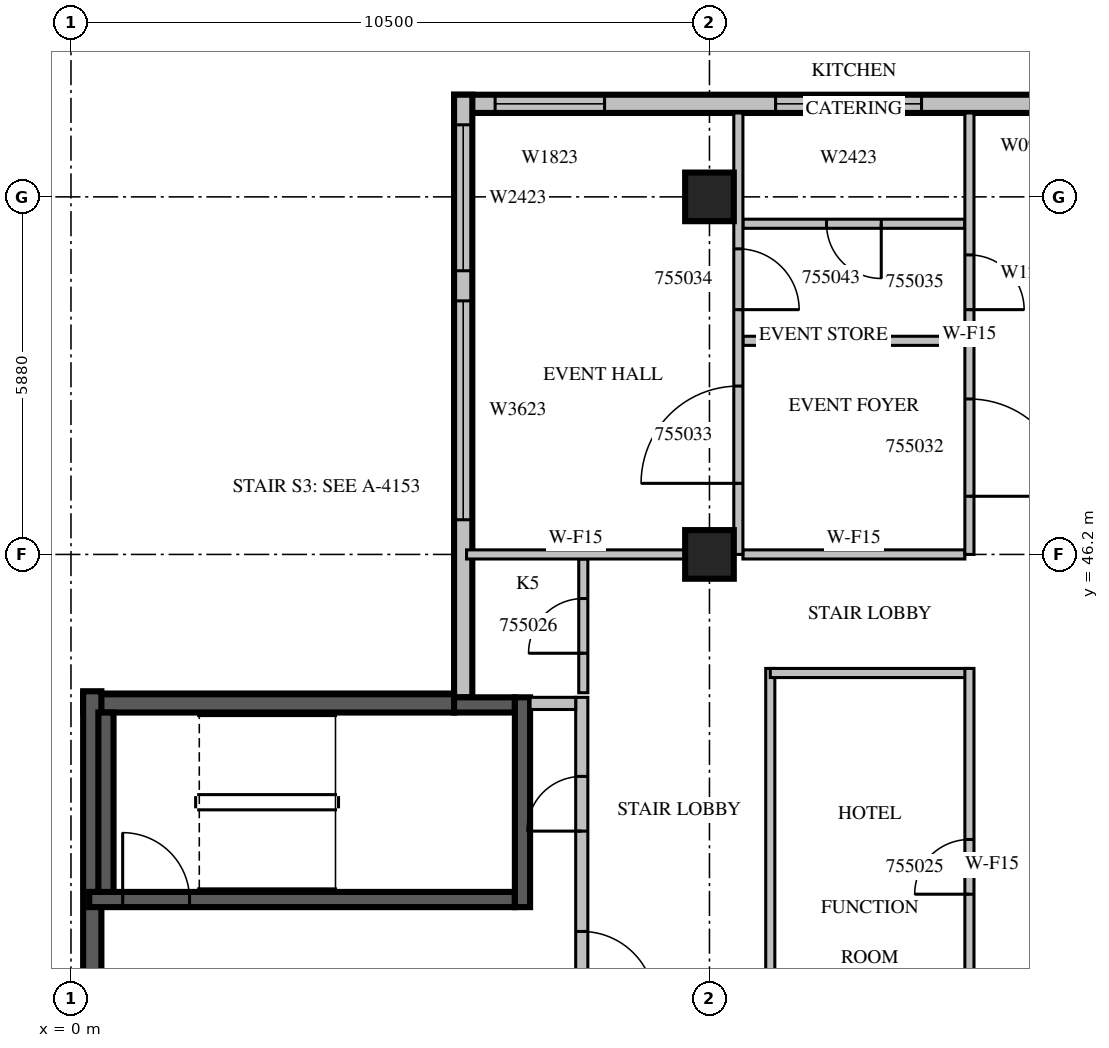
"""IFC4 building model, lengths in metres.
Left out: names, types, materials, properties, quantities, classifications, styles, units other than length and angle.
Written with IfcOpenShell. Run it as: python <this file> out.ifc"""

import sys

from ifc_helpers import new_model, si_unit, direction, frame, frame_2d, origin, origin_2d, place, context, subcontext, project, spatial, rectangle, extrude, source, transform, mapped, element, fill, save


model = new_model("IFC4")
c1 = context("Model", 3, precision=1e-05, world=origin(), true_north=direction((0.0, 1.0)))
c2 = subcontext(c1, "Body", "Model", "MODEL_VIEW")
j1 = project(units=[si_unit("LENGTHUNIT", "METRE"), si_unit("PLANEANGLEUNIT", "RADIAN")], contexts=[c1])
p1 = place(None, origin())
s1 = spatial("IfcSite", under=j1, at=p1, CompositionType="ELEMENT")
p2 = place(p1, origin())
s2 = spatial("IfcBuilding", under=s1, at=p2, CompositionType="ELEMENT")
p3 = place(p2, frame((0.0, 0.0, 242.4)))
s3 = spatial("IfcBuildingStorey", under=s2, at=p3, CompositionType="ELEMENT", Elevation=242.4)
m1 = source(origin(), c2, "Body", "SweptSolid", [
    extrude(rectangle(XDim=0.8, YDim=0.8, at=origin_2d()), origin(), (0.0, 0.0, 1.0), 3.8),
])
for number, where, z_axis, x_axis in (
    (1, (10.5, 46.2, 0.0), (0.0, 0.0, 1.0), (1.0, 0.0, 0.0)),
    (2, (10.5, 52.08, 0.0), (0.0, 0.0, 1.0), (1.0, 0.0, 0.0)),
):
    element("IfcColumn", number, at=place(p3, frame(where, z_axis=z_axis, x_axis=x_axis)), inside=s3, PredefinedType="COLUMN", context=c2, shape_type="MappedRepresentation", body=[
        mapped(m1, transform((0.0, 0.0, 0.0), scale=1.0)),
    ])
m2 = source(origin(), c2, "Body", "SweptSolid", [
    extrude(rectangle(XDim=10.5, YDim=0.3, at=frame_2d((5.25, 0.0))), origin(), (0.0, 0.0, 1.0), 3.4),
])
p4 = place(p3, frame((16.8, 53.61, 0.0), z_axis=(0.0, 0.0, 1.0), x_axis=(-1.0, 0.0, 0.0)))
e3 = element("IfcWall", 3, at=p4, inside=s3, PredefinedType="STANDARD", context=c2, shape_type="MappedRepresentation", body=[
    mapped(m2, transform((0.0, 0.0, 0.0), scale=1.0)),
])
m3 = source(origin(), c2, "Body", "SweptSolid", [
    extrude(rectangle(XDim=1.8, YDim=2.3, at=frame_2d((0.9, 1.15))), frame((0.0, 0.16, 0.0), z_axis=(0.0, -1.0, 0.0), x_axis=(1.0, 0.0, 0.0)), (0.0, 0.0, 1.0), 0.32),
])
p5 = place(p4, frame((8.025, 0.0, 0.6)))
e4 = element("IfcOpeningElement", 4, at=p5, cuts=e3, PredefinedType="OPENING", context=c2, shape_type="MappedRepresentation", body=[
    mapped(m3, transform((0.0, 0.0, 0.0), scale=1.0)),
])
m4 = source(origin(), c2, "Body", "SweptSolid", [
    extrude(rectangle(XDim=2.4, YDim=2.3, at=frame_2d((1.2, 1.15))), frame((0.0, 0.16, 0.0), z_axis=(0.0, -1.0, 0.0), x_axis=(1.0, 0.0, 0.0)), (0.0, 0.0, 1.0), 0.32),
])
p6 = place(p4, frame((2.812, 0.0, 0.6)))
e5 = element("IfcOpeningElement", 5, at=p6, cuts=e3, PredefinedType="OPENING", context=c2, shape_type="MappedRepresentation", body=[
    mapped(m4, transform((0.0, 0.0, 0.0), scale=1.0)),
])
m5 = source(origin(), c2, "Body", "SweptSolid", [
    extrude(rectangle(XDim=9.91, YDim=0.3, at=frame_2d((4.955, 0.0))), origin(), (0.0, 0.0, 1.0), 3.4),
])
p7 = place(p3, frame((6.45, 53.76, 0.0), z_axis=(0.0, 0.0, 1.0), x_axis=(0.0, -1.0, 0.0)))
e6 = element("IfcWall", 6, at=p7, inside=s3, PredefinedType="STANDARD", context=c2, shape_type="MappedRepresentation", body=[
    mapped(m5, transform((0.0, 0.0, 0.0), scale=1.0)),
])
m6 = source(origin(), c2, "Body", "SweptSolid", [
    extrude(rectangle(XDim=3.6, YDim=2.3, at=frame_2d((1.8, 1.15))), frame((0.0, 0.16, 0.0), z_axis=(0.0, -1.0, 0.0), x_axis=(1.0, 0.0, 0.0)), (0.0, 0.0, 1.0), 0.32),
])
p8 = place(p7, frame((3.39, 0.0, 0.6)))
e7 = element("IfcOpeningElement", 7, at=p8, cuts=e6, PredefinedType="OPENING", context=c2, shape_type="MappedRepresentation", body=[
    mapped(m6, transform((0.0, 0.0, 0.0), scale=1.0)),
])
p9 = place(p7, frame((0.495, 0.0, 0.6)))
e8 = element("IfcOpeningElement", 8, at=p9, cuts=e6, PredefinedType="OPENING", context=c2, shape_type="MappedRepresentation", body=[
    mapped(m4, transform((0.0, 0.0, 0.0), scale=1.0)),
])
m7 = source(origin(), c2, "Body", "SweptSolid", [
    extrude(rectangle(XDim=6.1, YDim=0.3, at=frame_2d((3.05, 0.0))), origin(), (0.0, 0.0, 1.0), 3.4),
])
p10 = place(p3, frame((6.3, 43.75, 0.0), z_axis=(0.0, 0.0, 1.0), x_axis=(-1.0, 0.0, 0.0)))
e9 = element("IfcWall", 9, at=p10, inside=s3, PredefinedType="SOLIDWALL", context=c2, shape_type="MappedRepresentation", body=[
    mapped(m7, transform((0.0, 0.0, 0.0), scale=1.0)),
])
m8 = source(origin(), c2, "Body", "SweptSolid", [
    extrude(rectangle(XDim=5.65, YDim=0.3, at=frame_2d((2.825, 0.0))), origin(), (0.0, 0.0, 1.0), 3.4),
])
p11 = place(p3, frame((0.35, 43.95, 0.0), z_axis=(0.0, 0.0, 1.0), x_axis=(0.0, -1.0, 0.0)))
e10 = element("IfcWall", 10, at=p11, inside=s3, PredefinedType="SOLIDWALL", context=c2, shape_type="MappedRepresentation", body=[
    mapped(m8, transform((0.0, 0.0, 0.0), scale=1.0)),
])
m9 = source(origin(), c2, "Body", "SweptSolid", [
    extrude(rectangle(XDim=7.0, YDim=0.25, at=frame_2d((3.5, 0.0))), origin(), (0.0, 0.0, 1.0), 3.4),
])
p12 = place(p3, frame((0.3, 40.525, 0.0), z_axis=(0.0, 0.0, 1.0), x_axis=(1.0, 0.0, 0.0)))
e11 = element("IfcWall", 11, at=p12, inside=s3, PredefinedType="SOLIDWALL", context=c2, shape_type="MappedRepresentation", body=[
    mapped(m9, transform((0.0, 0.0, 0.0), scale=1.0)),
])
m10 = source(origin(), c2, "Body", "SweptSolid", [
    extrude(rectangle(XDim=1.1, YDim=2.1, at=frame_2d((0.55, 1.05))), frame((0.0, 0.135, 0.0), z_axis=(0.0, -1.0, 0.0), x_axis=(1.0, 0.0, 0.0)), (0.0, 0.0, 1.0), 0.27),
])
p13 = place(p12, frame((0.55, 0.0, 0.0)))
e12 = element("IfcOpeningElement", 12, at=p13, cuts=e11, PredefinedType="OPENING", context=c2, shape_type="MappedRepresentation", body=[
    mapped(m10, transform((0.0, 0.0, 0.0), scale=1.0)),
])
m11 = source(origin(), c2, "Body", "SweptSolid", [
    extrude(rectangle(XDim=1.0, YDim=0.25, at=frame_2d((0.5, 0.0))), origin(), (0.0, 0.0, 1.0), 3.4),
])
p14 = place(p3, frame((6.3, 43.725, 0.0), z_axis=(0.0, 0.0, 1.0), x_axis=(1.0, 0.0, 0.0)))
e13 = element("IfcWall", 13, at=p14, inside=s3, PredefinedType="SOLIDWALL", context=c2, shape_type="MappedRepresentation", body=[
    mapped(m11, transform((0.0, 0.0, 0.0), scale=1.0)),
])
m12 = source(origin(), c2, "Body", "SweptSolid", [
    extrude(rectangle(XDim=3.45, YDim=0.25, at=frame_2d((1.725, 0.0))), origin(), (0.0, 0.0, 1.0), 3.4),
])
p15 = place(p3, frame((7.425, 40.4, 0.0), z_axis=(0.0, 0.0, 1.0), x_axis=(0.0, 1.0, 0.0)))
e14 = element("IfcWall", 14, at=p15, inside=s3, PredefinedType="SOLIDWALL", context=c2, shape_type="MappedRepresentation", body=[
    mapped(m12, transform((0.0, 0.0, 0.0), scale=1.0)),
])
m13 = source(origin(), c2, "Body", "SweptSolid", [
    extrude(rectangle(XDim=2.95, YDim=0.25, at=frame_2d((1.475, 0.0))), origin(), (0.0, 0.0, 1.0), 3.4),
])
p16 = place(p3, frame((0.575, 40.65, 0.0), z_axis=(0.0, 0.0, 1.0), x_axis=(0.0, 1.0, 0.0)))
e15 = element("IfcWall", 15, at=p16, inside=s3, PredefinedType="SOLIDWALL", context=c2, shape_type="MappedRepresentation", body=[
    mapped(m13, transform((0.0, 0.0, 0.0), scale=1.0)),
])
m14 = source(origin(), c2, "Body", "SweptSolid", [
    extrude(rectangle(XDim=5.45, YDim=0.2, at=frame_2d((2.725, 0.0))), origin(), (0.0, 0.0, 1.0), 3.4),
])
p17 = place(p3, frame((8.4, 38.4, 0.0), z_axis=(0.0, 0.0, 1.0), x_axis=(0.0, 1.0, 0.0)))
e16 = element("IfcWall", 16, at=p17, inside=s3, PredefinedType="PARTITIONING", context=c2, shape_type="MappedRepresentation", body=[
    mapped(m14, transform((0.0, 0.0, 0.0), scale=1.0)),
])
m15 = source(origin(), c2, "Body", "SweptSolid", [
    extrude(rectangle(XDim=1.2, YDim=2.1, at=frame_2d((0.6, 1.05))), frame((0.0, 0.11, 0.0), z_axis=(0.0, -1.0, 0.0), x_axis=(1.0, 0.0, 0.0)), (0.0, 0.0, 1.0), 0.22),
])
p18 = place(p17, frame((0.4, 0.0, 0.0)))
e17 = element("IfcOpeningElement", 17, at=p18, cuts=e16, PredefinedType="OPENING", context=c2, shape_type="MappedRepresentation", body=[
    mapped(m15, transform((0.0, 0.0, 0.0), scale=1.0)),
])
m16 = source(origin(), c2, "Body", "SweptSolid", [
    extrude(rectangle(XDim=0.9, YDim=2.1, at=frame_2d((0.45, 1.05))), frame((0.0, 0.11, 0.0), z_axis=(0.0, -1.0, 0.0), x_axis=(1.0, 0.0, 0.0)), (0.0, 0.0, 1.0), 0.22),
])
p19 = place(p17, frame((3.25, 0.0, 0.0)))
e18 = element("IfcOpeningElement", 18, at=p19, cuts=e16, PredefinedType="OPENING", context=c2, shape_type="MappedRepresentation", body=[
    mapped(m16, transform((0.0, 0.0, 0.0), scale=1.0)),
])
m17 = source(origin(), c2, "Body", "SweptSolid", [
    extrude(rectangle(XDim=0.75, YDim=0.2, at=frame_2d((0.375, 0.0))), origin(), (0.0, 0.0, 1.0), 3.4),
])
p20 = place(p3, frame((7.55, 43.75, 0.0), z_axis=(0.0, 0.0, 1.0), x_axis=(1.0, 0.0, 0.0)))
e19 = element("IfcWall", 19, at=p20, inside=s3, PredefinedType="PARTITIONING", context=c2, shape_type="MappedRepresentation", body=[
    mapped(m17, transform((0.0, 0.0, 0.0), scale=1.0)),
])
m18 = source(origin(), c2, "Body", "SweptSolid", [
    extrude(rectangle(XDim=6.45, YDim=0.15, at=frame_2d((3.225, 0.0))), origin(), (0.0, 0.0, 1.0), 3.4),
])
p21 = place(p3, frame((11.5, 44.325, 0.0), z_axis=(0.0, 0.0, 1.0), x_axis=(0.0, -1.0, 0.0)))
e20 = element("IfcWall", 20, at=p21, inside=s3, PredefinedType="PARTITIONING", context=c2, shape_type="MappedRepresentation", body=[
    mapped(m18, transform((0.0, 0.0, 0.0), scale=1.0)),
])
m19 = source(origin(), c2, "Body", "SweptSolid", [
    extrude(rectangle(XDim=3.275, YDim=0.15, at=frame_2d((1.637, 0.0))), origin(), (0.0, 0.0, 1.0), 3.4),
])
p22 = place(p3, frame((14.775, 44.25, 0.0), z_axis=(0.0, 0.0, 1.0), x_axis=(-1.0, 0.0, 0.0)))
e21 = element("IfcWall", 21, at=p22, inside=s3, PredefinedType="PARTITIONING", context=c2, shape_type="MappedRepresentation", body=[
    mapped(m19, transform((0.0, 0.0, 0.0), scale=1.0)),
])
p23 = place(p3, frame((14.775, 37.875, 0.0), z_axis=(0.0, 0.0, 1.0), x_axis=(0.0, 1.0, 0.0)))
e22 = element("IfcWall", 22, at=p23, inside=s3, PredefinedType="PARTITIONING", context=c2, shape_type="MappedRepresentation", body=[
    mapped(m18, transform((0.0, 0.0, 0.0), scale=1.0)),
])
m20 = source(origin(), c2, "Body", "SweptSolid", [
    extrude(rectangle(XDim=0.9, YDim=2.1, at=frame_2d((0.45, 1.05))), frame((0.0, 0.085, 0.0), z_axis=(0.0, -1.0, 0.0), x_axis=(1.0, 0.0, 0.0)), (0.0, 0.0, 1.0), 0.17),
])
p24 = place(p23, frame((2.737, 0.0, 0.0)))
e23 = element("IfcOpeningElement", 23, at=p24, cuts=e22, PredefinedType="OPENING", context=c2, shape_type="MappedRepresentation", body=[
    mapped(m20, transform((0.0, 0.0, 0.0), scale=1.0)),
])
m21 = source(origin(), c2, "Body", "SweptSolid", [
    extrude(rectangle(XDim=2.2, YDim=0.15, at=frame_2d((1.1, 0.0))), origin(), (0.0, 0.0, 1.0), 3.4),
])
p25 = place(p3, frame((8.425, 43.925, 0.0), z_axis=(0.0, 0.0, 1.0), x_axis=(0.0, 1.0, 0.0)))
e24 = element("IfcWall", 24, at=p25, inside=s3, PredefinedType="PARTITIONING", context=c2, shape_type="MappedRepresentation", body=[
    mapped(m21, transform((0.0, 0.0, 0.0), scale=1.0)),
])
p26 = place(p25, frame((0.65, 0.0, 0.0)))
e25 = element("IfcOpeningElement", 25, at=p26, cuts=e24, PredefinedType="OPENING", context=c2, shape_type="MappedRepresentation", body=[
    mapped(m20, transform((0.0, 0.0, 0.0), scale=1.0)),
])
m22 = source(origin(), c2, "Body", "SweptSolid", [
    extrude(rectangle(XDim=3.65, YDim=0.15, at=frame_2d((1.825, 0.0))), origin(), (0.0, 0.0, 1.0), 3.4),
])
p27 = place(p3, frame((14.7, 49.713, 0.0), z_axis=(0.0, 0.0, 1.0), x_axis=(-1.0, 0.0, 0.0)))
e26 = element("IfcWall", 26, at=p27, inside=s3, PredefinedType="PARTITIONING", context=c2, shape_type="MappedRepresentation", body=[
    mapped(m22, transform((0.0, 0.0, 0.0), scale=1.0)),
])
p28 = place(p3, frame((14.7, 51.638, 0.0), z_axis=(0.0, 0.0, 1.0), x_axis=(-1.0, 0.0, 0.0)))
e27 = element("IfcWall", 27, at=p28, inside=s3, PredefinedType="PARTITIONING", context=c2, shape_type="MappedRepresentation", body=[
    mapped(m22, transform((0.0, 0.0, 0.0), scale=1.0)),
])
p29 = place(p28, frame((1.375, 0.0, 0.0)))
e28 = element("IfcOpeningElement", 28, at=p29, cuts=e27, PredefinedType="OPENING", context=c2, shape_type="MappedRepresentation", body=[
    mapped(m20, transform((0.0, 0.0, 0.0), scale=1.0)),
])
m23 = source(origin(), c2, "Body", "SweptSolid", [
    extrude(rectangle(XDim=3.596, YDim=0.15, at=frame_2d((1.798, 0.0))), origin(), (0.0, 0.0, 1.0), 3.4),
])
p30 = place(p3, frame((10.101, 46.2, 0.0), z_axis=(0.0, 0.0, 1.0), x_axis=(-1.0, 0.0, 0.0)))
e29 = element("IfcWall", 29, at=p30, inside=s3, PredefinedType="PARTITIONING", context=c2, shape_type="MappedRepresentation", body=[
    mapped(m23, transform((0.0, 0.0, 0.0), scale=1.0)),
])
p31 = place(p3, frame((14.7, 46.2, 0.0), z_axis=(0.0, 0.0, 1.0), x_axis=(-1.0, 0.0, 0.0)))
e30 = element("IfcWall", 30, at=p31, inside=s3, PredefinedType="PARTITIONING", context=c2, shape_type="MappedRepresentation", body=[
    mapped(m22, transform((0.0, 0.0, 0.0), scale=1.0)),
])
m24 = source(origin(), c2, "Body", "SweptSolid", [
    extrude(rectangle(XDim=7.26, YDim=0.15, at=frame_2d((3.63, 0.0))), origin(), (0.0, 0.0, 1.0), 3.4),
])
p32 = place(p3, frame((10.975, 46.2, 0.0), z_axis=(0.0, 0.0, 1.0), x_axis=(0.0, 1.0, 0.0)))
e31 = element("IfcWall", 31, at=p32, inside=s3, PredefinedType="PARTITIONING", context=c2, shape_type="MappedRepresentation", body=[
    mapped(m24, transform((0.0, 0.0, 0.0), scale=1.0)),
])
m25 = source(origin(), c2, "Body", "SweptSolid", [
    extrude(rectangle(XDim=1.6, YDim=2.1, at=frame_2d((0.8, 1.05))), frame((0.0, 0.085, 0.0), z_axis=(0.0, -1.0, 0.0), x_axis=(1.0, 0.0, 0.0)), (0.0, 0.0, 1.0), 0.17),
])
p33 = place(p32, frame((1.169, 0.0, 0.0)))
e32 = element("IfcOpeningElement", 32, at=p33, cuts=e31, PredefinedType="OPENING", context=c2, shape_type="MappedRepresentation", body=[
    mapped(m25, transform((0.0, 0.0, 0.0), scale=1.0)),
])
m26 = source(origin(), c2, "Body", "SweptSolid", [
    extrude(rectangle(XDim=1.0, YDim=2.1, at=frame_2d((0.5, 1.05))), frame((0.0, 0.085, 0.0), z_axis=(0.0, -1.0, 0.0), x_axis=(1.0, 0.0, 0.0)), (0.0, 0.0, 1.0), 0.17),
])
p34 = place(p32, frame((4.025, 0.0, 0.0)))
e33 = element("IfcOpeningElement", 33, at=p34, cuts=e31, PredefinedType="OPENING", context=c2, shape_type="MappedRepresentation", body=[
    mapped(m26, transform((0.0, 0.0, 0.0), scale=1.0)),
])
p35 = place(p3, frame((14.775, 46.2, 0.0), z_axis=(0.0, 0.0, 1.0), x_axis=(0.0, 1.0, 0.0)))
e34 = element("IfcWall", 34, at=p35, inside=s3, PredefinedType="PARTITIONING", context=c2, shape_type="MappedRepresentation", body=[
    mapped(m24, transform((0.0, 0.0, 0.0), scale=1.0)),
])
p36 = place(p35, frame((0.956, 0.0, 0.0)))
e35 = element("IfcOpeningElement", 35, at=p36, cuts=e34, PredefinedType="OPENING", context=c2, shape_type="MappedRepresentation", body=[
    mapped(m25, transform((0.0, 0.0, 0.0), scale=1.0)),
])
p37 = place(p35, frame((4.025, 0.0, 0.0)))
e36 = element("IfcOpeningElement", 36, at=p37, cuts=e34, PredefinedType="OPENING", context=c2, shape_type="MappedRepresentation", body=[
    mapped(m20, transform((0.0, 0.0, 0.0), scale=1.0)),
])
m27 = source(origin(), c2, "Body", "SweptSolid", [
    extrude(rectangle(XDim=1.8, YDim=2.3, at=frame_2d((0.9, 1.15))), frame((0.0, 0.03, 0.0), z_axis=(0.0, -1.0, 0.0), x_axis=(1.0, 0.0, 0.0)), (0.0, 0.0, 1.0), 0.06),
])
p38 = place(p5, origin())
e37 = element("IfcWindow", 37, at=p38, inside=s3, PartitioningType="SINGLE_PANEL", PredefinedType="WINDOW", context=c2, shape_type="MappedRepresentation", body=[
    mapped(m27, transform((0.0, 0.0, 0.0), scale=1.0)),
])
fill(e4, e37)
m28 = source(origin(), c2, "Body", "SweptSolid", [
    extrude(rectangle(XDim=2.4, YDim=2.3, at=frame_2d((1.2, 1.15))), frame((0.0, 0.03, 0.0), z_axis=(0.0, -1.0, 0.0), x_axis=(1.0, 0.0, 0.0)), (0.0, 0.0, 1.0), 0.06),
])
p39 = place(p6, origin())
e38 = element("IfcWindow", 38, at=p39, inside=s3, PartitioningType="SINGLE_PANEL", PredefinedType="WINDOW", context=c2, shape_type="MappedRepresentation", body=[
    mapped(m28, transform((0.0, 0.0, 0.0), scale=1.0)),
])
fill(e5, e38)
m29 = source(origin(), c2, "Body", "SweptSolid", [
    extrude(rectangle(XDim=3.6, YDim=2.3, at=frame_2d((1.8, 1.15))), frame((0.0, 0.03, 0.0), z_axis=(0.0, -1.0, 0.0), x_axis=(1.0, 0.0, 0.0)), (0.0, 0.0, 1.0), 0.06),
])
p40 = place(p8, origin())
e39 = element("IfcWindow", 39, at=p40, inside=s3, PartitioningType="SINGLE_PANEL", PredefinedType="WINDOW", context=c2, shape_type="MappedRepresentation", body=[
    mapped(m29, transform((0.0, 0.0, 0.0), scale=1.0)),
])
fill(e7, e39)
p41 = place(p9, origin())
e40 = element("IfcWindow", 40, at=p41, inside=s3, PartitioningType="SINGLE_PANEL", PredefinedType="WINDOW", context=c2, shape_type="MappedRepresentation", body=[
    mapped(m28, transform((0.0, 0.0, 0.0), scale=1.0)),
])
fill(e8, e40)
m30 = source(origin(), c2, "Body", "SweptSolid", [
    extrude(rectangle(XDim=1.1, YDim=2.1, at=frame_2d((0.55, 1.05))), frame((0.0, 0.025, 0.0), z_axis=(0.0, -1.0, 0.0), x_axis=(1.0, 0.0, 0.0)), (0.0, 0.0, 1.0), 0.05),
])
p42 = place(p13, origin())
e41 = element("IfcDoor", 41, at=p42, inside=s3, OperationType="SINGLE_SWING_LEFT", PredefinedType="DOOR", context=c2, shape_type="MappedRepresentation", body=[
    mapped(m30, transform((0.0, 0.0, 0.0), scale=1.0)),
])
fill(e12, e41)
m31 = source(origin(), c2, "Body", "SweptSolid", [
    extrude(rectangle(XDim=1.2, YDim=2.1, at=frame_2d((0.6, 1.05))), frame((0.0, 0.025, 0.0), z_axis=(0.0, -1.0, 0.0), x_axis=(1.0, 0.0, 0.0)), (0.0, 0.0, 1.0), 0.05),
])
p43 = place(p18, origin())
e42 = element("IfcDoor", 42, at=p43, inside=s3, OperationType="SINGLE_SWING_RIGHT", PredefinedType="DOOR", context=c2, shape_type="MappedRepresentation", body=[
    mapped(m31, transform((0.0, 0.0, 0.0), scale=1.0)),
])
fill(e17, e42)
m32 = source(origin(), c2, "Body", "SweptSolid", [
    extrude(rectangle(XDim=0.9, YDim=2.1, at=frame_2d((0.45, 1.05))), frame((0.0, 0.025, 0.0), z_axis=(0.0, -1.0, 0.0), x_axis=(1.0, 0.0, 0.0)), (0.0, 0.0, 1.0), 0.05),
])
p44 = place(p19, origin())
e43 = element("IfcDoor", 43, at=p44, inside=s3, OperationType="SINGLE_SWING_LEFT", PredefinedType="DOOR", context=c2, shape_type="MappedRepresentation", body=[
    mapped(m32, transform((0.0, 0.0, 0.0), scale=1.0)),
])
fill(e18, e43)
p45 = place(p24, origin())
e44 = element("IfcDoor", 44, at=p45, inside=s3, OperationType="SINGLE_SWING_LEFT", PredefinedType="DOOR", context=c2, shape_type="MappedRepresentation", body=[
    mapped(m32, transform((0.0, 0.0, 0.0), scale=1.0)),
])
fill(e23, e44)
p46 = place(p26, origin())
e45 = element("IfcDoor", 45, at=p46, inside=s3, OperationType="SINGLE_SWING_LEFT", PredefinedType="DOOR", context=c2, shape_type="MappedRepresentation", body=[
    mapped(m32, transform((0.0, 0.0, 0.0), scale=1.0)),
])
fill(e25, e45)
m33 = source(origin(), c2, "Body", "SweptSolid", [
    extrude(rectangle(XDim=1.6, YDim=2.1, at=frame_2d((0.8, 1.05))), frame((0.0, 0.025, 0.0), z_axis=(0.0, -1.0, 0.0), x_axis=(1.0, 0.0, 0.0)), (0.0, 0.0, 1.0), 0.05),
])
p47 = place(p36, origin())
e46 = element("IfcDoor", 46, at=p47, inside=s3, OperationType="SINGLE_SWING_RIGHT", PredefinedType="DOOR", context=c2, shape_type="MappedRepresentation", body=[
    mapped(m33, transform((0.0, 0.0, 0.0), scale=1.0)),
])
fill(e35, e46)
p48 = place(p33, origin())
e47 = element("IfcDoor", 47, at=p48, inside=s3, OperationType="SINGLE_SWING_LEFT", PredefinedType="DOOR", context=c2, shape_type="MappedRepresentation", body=[
    mapped(m33, transform((0.0, 0.0, 0.0), scale=1.0)),
])
fill(e32, e47)
m34 = source(origin(), c2, "Body", "SweptSolid", [
    extrude(rectangle(XDim=1.0, YDim=2.1, at=frame_2d((0.5, 1.05))), frame((0.0, 0.025, 0.0), z_axis=(0.0, -1.0, 0.0), x_axis=(1.0, 0.0, 0.0)), (0.0, 0.0, 1.0), 0.05),
])
p49 = place(p34, origin())
e48 = element("IfcDoor", 48, at=p49, inside=s3, OperationType="SINGLE_SWING_RIGHT", PredefinedType="DOOR", context=c2, shape_type="MappedRepresentation", body=[
    mapped(m34, transform((0.0, 0.0, 0.0), scale=1.0)),
])
fill(e33, e48)
p50 = place(p37, origin())
e49 = element("IfcDoor", 49, at=p50, inside=s3, OperationType="SINGLE_SWING_RIGHT", PredefinedType="DOOR", context=c2, shape_type="MappedRepresentation", body=[
    mapped(m32, transform((0.0, 0.0, 0.0), scale=1.0)),
])
fill(e36, e49)
p51 = place(p29, origin())
e50 = element("IfcDoor", 50, at=p51, inside=s3, OperationType="SINGLE_SWING_LEFT", PredefinedType="DOOR", context=c2, shape_type="MappedRepresentation", body=[
    mapped(m32, transform((0.0, 0.0, 0.0), scale=1.0)),
])
fill(e28, e50)
save(model, sys.argv[1])
